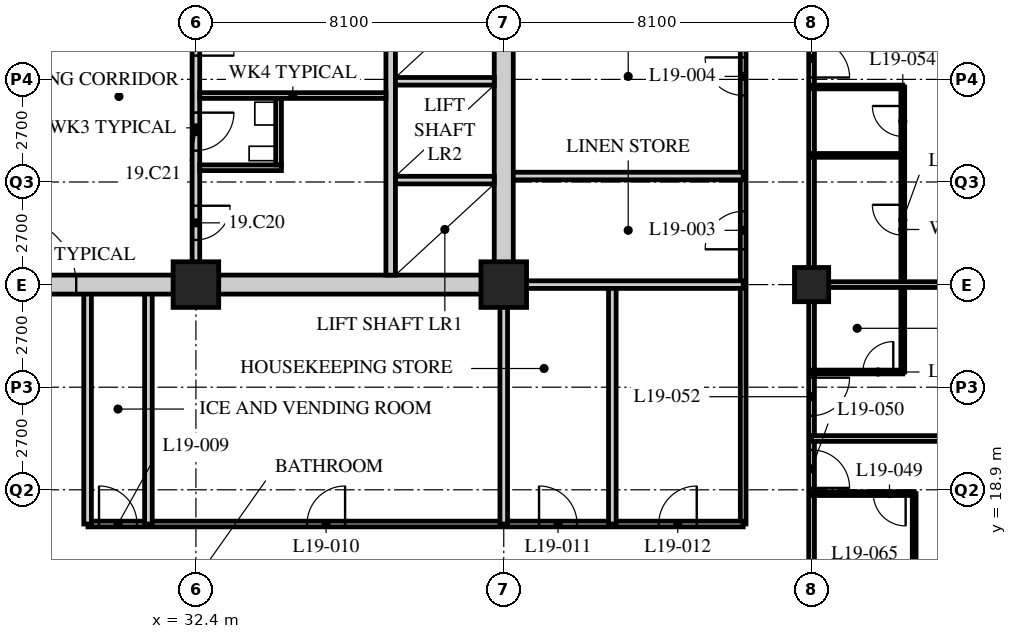
"""IFC4 building model, lengths in metres.
Left out: names, types, materials, properties, quantities, classifications, styles, units other than length and angle.
Written with IfcOpenShell. Run it as: python <this file> out.ifc"""

import sys

from ifc_helpers import new_model, si_unit, direction, frame, frame_2d, origin, origin_2d, place, context, subcontext, project, spatial, rectangle, hollow_rectangle, extrude, element, fill, save


model = new_model("IFC4")
c1 = context("Model", 3, precision=1e-05, world=origin(), true_north=direction((0.0, 1.0)))
c2 = subcontext(c1, "Body", "Model", "MODEL_VIEW")
j1 = project(units=[si_unit("LENGTHUNIT", "METRE"), si_unit("PLANEANGLEUNIT", "RADIAN")], contexts=[c1])
p1 = place(None, origin())
s1 = spatial("IfcSite", under=j1, at=p1, CompositionType="ELEMENT")
p2 = place(p1, origin())
s2 = spatial("IfcBuilding", under=s1, at=p2, CompositionType="ELEMENT")
p3 = place(p2, frame((0.0, 0.0, 77.2)))
s3 = spatial("IfcBuildingStorey", under=s2, at=p3, CompositionType="ELEMENT", Elevation=77.2)
for number, where, z_axis, x_axis in (
    (1, (32.4, 24.3, 0.0), (0.0, 0.0, 1.0), (1.0, 0.0, 0.0)),
    (2, (40.5, 24.3, 0.0), (0.0, 0.0, 1.0), (1.0, 0.0, 0.0)),
):
    element("IfcColumn", number, at=place(p3, frame(where, z_axis=z_axis, x_axis=x_axis)), inside=s3, PredefinedType="COLUMN", context=c2, shape_type="SweptSolid", body=[
        extrude(hollow_rectangle(XDim=1.2, YDim=1.2, WallThickness=0.12, at=origin_2d()), origin(), (0.0, 0.0, 1.0), 3.4),
    ])
p4 = place(p3, frame((48.6, 24.3, 0.0), z_axis=(0.0, 0.0, 1.0), x_axis=(1.0, 0.0, 0.0)))
e3 = element("IfcColumn", 3, at=p4, inside=s3, PredefinedType="COLUMN", context=c2, shape_type="SweptSolid", body=[
    extrude(hollow_rectangle(XDim=0.9, YDim=0.9, WallThickness=0.09, at=origin_2d()), origin(), (0.0, 0.0, 1.0), 3.4),
])
p5 = place(p3, frame((48.6, 16.2, 0.0), z_axis=(0.0, 0.0, 1.0), x_axis=(0.0, 1.0, 0.0)))
e4 = element("IfcWall", 4, at=p5, inside=s3, PredefinedType="PARTITIONING", context=c2, shape_type="SweptSolid", body=[
    extrude(rectangle(XDim=26.1, YDim=0.15, at=frame_2d((13.05, 0.0))), origin(), (0.0, 0.0, 1.0), 2.428),
])
p6 = place(p5, frame((2.75, 0.0, 0.0)))
e5 = element("IfcOpeningElement", 5, at=p6, cuts=e4, PredefinedType="OPENING", context=c2, shape_type="SweptSolid", body=[
    extrude(rectangle(XDim=1.0, YDim=2.1, at=frame_2d((0.5, 1.05))), frame((0.0, 0.085, 0.0), z_axis=(0.0, -1.0, 0.0), x_axis=(1.0, 0.0, 0.0)), (0.0, 0.0, 1.0), 0.17),
])
p7 = place(p5, frame((4.65, 0.0, 0.0)))
e6 = element("IfcOpeningElement", 6, at=p7, cuts=e4, PredefinedType="OPENING", context=c2, shape_type="SweptSolid", body=[
    extrude(rectangle(XDim=1.0, YDim=2.1, at=frame_2d((0.5, 1.05))), frame((0.0, 0.085, 0.0), z_axis=(0.0, -1.0, 0.0), x_axis=(1.0, 0.0, 0.0)), (0.0, 0.0, 1.0), 0.17),
])
p8 = place(p5, frame((13.55, 0.0, 0.0)))
e7 = element("IfcOpeningElement", 7, at=p8, cuts=e4, PredefinedType="OPENING", context=c2, shape_type="SweptSolid", body=[
    extrude(rectangle(XDim=1.0, YDim=2.1, at=frame_2d((0.5, 1.05))), frame((0.0, 0.085, 0.0), z_axis=(0.0, -1.0, 0.0), x_axis=(1.0, 0.0, 0.0)), (0.0, 0.0, 1.0), 0.17),
])
p9 = place(p5, frame((21.65, 0.0, 0.0)))
e8 = element("IfcOpeningElement", 8, at=p9, cuts=e4, PredefinedType="OPENING", context=c2, shape_type="SweptSolid", body=[
    extrude(rectangle(XDim=1.0, YDim=2.1, at=frame_2d((0.5, 1.05))), frame((0.0, 0.085, 0.0), z_axis=(0.0, -1.0, 0.0), x_axis=(1.0, 0.0, 0.0)), (0.0, 0.0, 1.0), 0.17),
])
p10 = place(p3, frame((46.8, 18.0, 0.0), z_axis=(0.0, 0.0, 1.0), x_axis=(0.0, 1.0, 0.0)))
e9 = element("IfcWall", 9, at=p10, inside=s3, PredefinedType="PARTITIONING", context=c2, shape_type="SweptSolid", body=[
    extrude(rectangle(XDim=22.5, YDim=0.15, at=frame_2d((11.25, 0.0))), origin(), (0.0, 0.0, 1.0), 3.19),
])
p11 = place(p10, frame((7.229, 0.0, 0.0)))
e10 = element("IfcOpeningElement", 10, at=p11, cuts=e9, PredefinedType="OPENING", context=c2, shape_type="SweptSolid", body=[
    extrude(rectangle(XDim=1.0, YDim=2.1, at=frame_2d((0.5, 1.05))), frame((0.0, 0.085, 0.0), z_axis=(0.0, -1.0, 0.0), x_axis=(1.0, 0.0, 0.0)), (0.0, 0.0, 1.0), 0.17),
])
p12 = place(p10, frame((11.279, 0.0, 0.0)))
e11 = element("IfcOpeningElement", 11, at=p12, cuts=e9, PredefinedType="OPENING", context=c2, shape_type="SweptSolid", body=[
    extrude(rectangle(XDim=1.0, YDim=2.1, at=frame_2d((0.5, 1.05))), frame((0.0, 0.085, 0.0), z_axis=(0.0, -1.0, 0.0), x_axis=(1.0, 0.0, 0.0)), (0.0, 0.0, 1.0), 0.17),
])
p13 = place(p10, frame((14.7, 0.0, 0.0)))
e12 = element("IfcOpeningElement", 12, at=p13, cuts=e9, PredefinedType="OPENING", context=c2, shape_type="SweptSolid", body=[
    extrude(rectangle(XDim=1.0, YDim=2.1, at=frame_2d((0.5, 1.05))), frame((0.0, 0.085, 0.0), z_axis=(0.0, -1.0, 0.0), x_axis=(1.0, 0.0, 0.0)), (0.0, 0.0, 1.0), 0.17),
])
p14 = place(p10, frame((18.75, 0.0, 0.0)))
e13 = element("IfcOpeningElement", 13, at=p14, cuts=e9, PredefinedType="OPENING", context=c2, shape_type="SweptSolid", body=[
    extrude(rectangle(XDim=1.0, YDim=2.1, at=frame_2d((0.5, 1.05))), frame((0.0, 0.085, 0.0), z_axis=(0.0, -1.0, 0.0), x_axis=(1.0, 0.0, 0.0)), (0.0, 0.0, 1.0), 0.17),
])
p15 = place(p3, frame((29.56, 18.0, 0.0), z_axis=(0.0, 0.0, 1.0), x_axis=(1.0, 0.0, 0.0)))
e14 = element("IfcWall", 14, at=p15, inside=s3, PredefinedType="PARTITIONING", context=c2, shape_type="SweptSolid", body=[
    extrude(rectangle(XDim=17.24, YDim=0.15, at=frame_2d((8.62, 0.0))), origin(), (0.0, 0.0, 1.0), 3.19),
])
p16 = place(p15, frame((0.29, 0.0, 0.0)))
e15 = element("IfcOpeningElement", 15, at=p16, cuts=e14, PredefinedType="OPENING", context=c2, shape_type="SweptSolid", body=[
    extrude(rectangle(XDim=1.0, YDim=2.1, at=frame_2d((0.5, 1.05))), frame((0.0, 0.085, 0.0), z_axis=(0.0, -1.0, 0.0), x_axis=(1.0, 0.0, 0.0)), (0.0, 0.0, 1.0), 0.17),
])
p17 = place(p15, frame((5.765, 0.0, 0.0)))
e16 = element("IfcOpeningElement", 16, at=p17, cuts=e14, PredefinedType="OPENING", context=c2, shape_type="SweptSolid", body=[
    extrude(rectangle(XDim=1.0, YDim=2.1, at=frame_2d((0.5, 1.05))), frame((0.0, 0.085, 0.0), z_axis=(0.0, -1.0, 0.0), x_axis=(1.0, 0.0, 0.0)), (0.0, 0.0, 1.0), 0.17),
])
p18 = place(p15, frame((11.869, 0.0, 0.0)))
e17 = element("IfcOpeningElement", 17, at=p18, cuts=e14, PredefinedType="OPENING", context=c2, shape_type="SweptSolid", body=[
    extrude(rectangle(XDim=1.0, YDim=2.1, at=frame_2d((0.5, 1.05))), frame((0.0, 0.085, 0.0), z_axis=(0.0, -1.0, 0.0), x_axis=(1.0, 0.0, 0.0)), (0.0, 0.0, 1.0), 0.17),
])
p19 = place(p15, frame((15.019, 0.0, 0.0)))
e18 = element("IfcOpeningElement", 18, at=p19, cuts=e14, PredefinedType="OPENING", context=c2, shape_type="SweptSolid", body=[
    extrude(rectangle(XDim=1.0, YDim=2.1, at=frame_2d((0.5, 1.05))), frame((0.0, 0.085, 0.0), z_axis=(0.0, -1.0, 0.0), x_axis=(1.0, 0.0, 0.0)), (0.0, 0.0, 1.0), 0.17),
])
p20 = place(p3, frame((46.8, 27.157, 0.0), z_axis=(0.0, 0.0, 1.0), x_axis=(-1.0, 0.0, 0.0)))
e19 = element("IfcWall", 19, at=p20, inside=s3, PredefinedType="SOLIDWALL", context=c2, shape_type="SweptSolid", body=[
    extrude(rectangle(XDim=6.3, YDim=0.2, at=frame_2d((3.15, 0.0))), origin(), (0.0, 0.0, 1.0), 3.19),
])
p21 = place(p3, frame((40.5, 18.0, 0.0), z_axis=(0.0, 0.0, 1.0), x_axis=(0.0, 1.0, 0.0)))
e20 = element("IfcWall", 20, at=p21, inside=s3, PredefinedType="SOLIDWALL", context=c2, shape_type="SweptSolid", body=[
    extrude(rectangle(XDim=6.3, YDim=0.2, at=frame_2d((3.15, 0.0))), origin(), (0.0, 0.0, 1.0), 2.428),
])
for number, where, z_axis, x_axis in (
    (21, (31.15, 18.0, 0.0), (0.0, 0.0, 1.0), (0.0, 1.0, 0.0)),
    (22, (43.357, 18.0, 0.0), (0.0, 0.0, 1.0), (0.0, 1.0, 0.0)),
    (23, (29.55, 18.0, 0.0), (0.0, 0.0, 1.0), (0.0, 1.0, 0.0)),
):
    element("IfcWall", number, at=place(p3, frame(where, z_axis=z_axis, x_axis=x_axis)), inside=s3, PredefinedType="SOLIDWALL", context=c2, shape_type="SweptSolid", body=[
        extrude(rectangle(XDim=6.3, YDim=0.2, at=frame_2d((3.15, 0.0))), origin(), (0.0, 0.0, 1.0), 3.19),
    ])
p22 = place(p3, frame((40.5, 24.3, 0.0), z_axis=(0.0, 0.0, 1.0), x_axis=(1.0, 0.0, 0.0)))
e24 = element("IfcWall", 24, at=p22, inside=s3, PredefinedType="SOLIDWALL", context=c2, shape_type="SweptSolid", body=[
    extrude(rectangle(XDim=6.3, YDim=0.2, at=frame_2d((3.15, 0.0))), origin(), (0.0, 0.0, 1.0), 2.428),
])
p23 = place(p3, frame((51.3, 16.2, 0.0), z_axis=(0.0, 0.0, 1.0), x_axis=(0.0, 1.0, 0.0)))
e25 = element("IfcWall", 25, at=p23, inside=s3, PredefinedType="PARTITIONING", context=c2, shape_type="SweptSolid", body=[
    extrude(rectangle(XDim=2.6, YDim=0.1, at=frame_2d((1.3, 0.0))), origin(), (0.0, 0.0, 1.0), 3.19),
])
p24 = place(p3, frame((48.6, 18.8, 0.0), z_axis=(0.0, 0.0, 1.0), x_axis=(1.0, 0.0, 0.0)))
e26 = element("IfcWall", 26, at=p24, inside=s3, PredefinedType="PARTITIONING", context=c2, shape_type="SweptSolid", body=[
    extrude(rectangle(XDim=2.7, YDim=0.1, at=frame_2d((1.35, 0.0))), origin(), (0.0, 0.0, 1.0), 3.19),
])
p25 = place(p24, frame((1.625, 0.0, 0.0)))
e27 = element("IfcOpeningElement", 27, at=p25, cuts=e26, PredefinedType="OPENING", context=c2, shape_type="SweptSolid", body=[
    extrude(rectangle(XDim=0.85, YDim=2.1, at=frame_2d((0.425, 1.05))), frame((0.0, 0.06, 0.0), z_axis=(0.0, -1.0, 0.0), x_axis=(1.0, 0.0, 0.0)), (0.0, 0.0, 1.0), 0.12),
])
p26 = place(p3, frame((48.6, 20.25, 0.0), z_axis=(0.0, 0.0, 1.0), x_axis=(1.0, 0.0, 0.0)))
e28 = element("IfcWall", 28, at=p26, inside=s3, PredefinedType="PARTITIONING", context=c2, shape_type="SweptSolid", body=[
    extrude(rectangle(XDim=7.8, YDim=0.15, at=frame_2d((3.9, 0.0))), origin(), (0.0, 0.0, 1.0), 3.19),
])
p27 = place(p3, frame((51.0, 22.0, 0.0), z_axis=(0.0, 0.0, 1.0), x_axis=(0.0, 1.0, 0.0)))
e29 = element("IfcWall", 29, at=p27, inside=s3, PredefinedType="PARTITIONING", context=c2, shape_type="SweptSolid", body=[
    extrude(rectangle(XDim=7.5, YDim=0.1, at=frame_2d((3.75, 0.0))), origin(), (0.0, 0.0, 1.0), 3.19),
])
p28 = place(p27, frame((3.6, 0.0, 0.0)))
e30 = element("IfcOpeningElement", 30, at=p28, cuts=e29, PredefinedType="OPENING", context=c2, shape_type="SweptSolid", body=[
    extrude(rectangle(XDim=0.8, YDim=2.1, at=frame_2d((0.4, 1.05))), frame((0.0, 0.06, 0.0), z_axis=(0.0, -1.0, 0.0), x_axis=(1.0, 0.0, 0.0)), (0.0, 0.0, 1.0), 0.12),
])
p29 = place(p27, frame((6.2, 0.0, 0.0)))
e31 = element("IfcOpeningElement", 31, at=p29, cuts=e29, PredefinedType="OPENING", context=c2, shape_type="SweptSolid", body=[
    extrude(rectangle(XDim=0.8, YDim=2.1, at=frame_2d((0.4, 1.05))), frame((0.0, 0.06, 0.0), z_axis=(0.0, -1.0, 0.0), x_axis=(1.0, 0.0, 0.0)), (0.0, 0.0, 1.0), 0.12),
])
p30 = place(p3, frame((48.6, 22.0, 0.0), z_axis=(0.0, 0.0, 1.0), x_axis=(1.0, 0.0, 0.0)))
e32 = element("IfcWall", 32, at=p30, inside=s3, PredefinedType="PARTITIONING", context=c2, shape_type="SweptSolid", body=[
    extrude(rectangle(XDim=2.4, YDim=0.1, at=frame_2d((1.2, 0.0))), origin(), (0.0, 0.0, 1.0), 3.19),
])
p31 = place(p30, frame((1.35, 0.0, 0.0)))
e33 = element("IfcOpeningElement", 33, at=p31, cuts=e32, PredefinedType="OPENING", context=c2, shape_type="SweptSolid", body=[
    extrude(rectangle(XDim=0.8, YDim=2.1, at=frame_2d((0.4, 1.05))), frame((0.0, 0.06, 0.0), z_axis=(0.0, -1.0, 0.0), x_axis=(1.0, 0.0, 0.0)), (0.0, 0.0, 1.0), 0.12),
])
p32 = place(p3, frame((48.6, 24.3, 0.0), z_axis=(0.0, 0.0, 1.0), x_axis=(1.0, 0.0, 0.0)))
e34 = element("IfcWall", 34, at=p32, inside=s3, PredefinedType="PARTITIONING", context=c2, shape_type="SweptSolid", body=[
    extrude(rectangle(XDim=7.8, YDim=0.15, at=frame_2d((3.9, 0.0))), origin(), (0.0, 0.0, 1.0), 2.428),
])
for number, where, z_axis, x_axis in (
    (35, (48.6, 27.7, 0.0), (0.0, 0.0, 1.0), (1.0, 0.0, 0.0)),
    (36, (48.6, 29.5, 0.0), (0.0, 0.0, 1.0), (1.0, 0.0, 0.0)),
):
    element("IfcWall", number, at=place(p3, frame(where, z_axis=z_axis, x_axis=x_axis)), inside=s3, PredefinedType="PARTITIONING", context=c2, shape_type="SweptSolid", body=[
        extrude(rectangle(XDim=2.4, YDim=0.1, at=frame_2d((1.2, 0.0))), origin(), (0.0, 0.0, 1.0), 3.19),
    ])
p33 = place(p3, frame((15.95, 24.3, 0.0), z_axis=(0.0, 0.0, 1.0), x_axis=(1.0, 0.0, 0.0)))
e37 = element("IfcWall", 37, at=p33, inside=s3, PredefinedType="SOLIDWALL", context=c2, shape_type="SweptSolid", body=[
    extrude(rectangle(XDim=24.8, YDim=0.5, at=frame_2d((12.4, 0.0))), origin(), (0.0, 0.0, 1.0), 2.428),
])
p34 = place(p33, frame((11.5, 0.0, 0.0)))
e38 = element("IfcOpeningElement", 38, at=p34, cuts=e37, PredefinedType="OPENING", context=c2, shape_type="SweptSolid", body=[
    extrude(rectangle(XDim=1.8, YDim=2.4, at=frame_2d((0.9, 1.2))), frame((0.0, 0.26, 0.0), z_axis=(0.0, -1.0, 0.0), x_axis=(1.0, 0.0, 0.0)), (0.0, 0.0, 1.0), 0.52),
])
p35 = place(p3, frame((40.5, 24.55, 0.0), z_axis=(0.0, 0.0, 1.0), x_axis=(0.0, 1.0, 0.0)))
e39 = element("IfcWall", 39, at=p35, inside=s3, PredefinedType="SOLIDWALL", context=c2, shape_type="SweptSolid", body=[
    extrude(rectangle(XDim=15.7, YDim=0.5, at=frame_2d((7.85, 0.0))), origin(), (0.0, 0.0, 1.0), 2.428),
])
p36 = place(p3, frame((37.525, 24.55, 0.0), z_axis=(0.0, 0.0, 1.0), x_axis=(0.0, 1.0, 0.0)))
e40 = element("IfcWall", 40, at=p36, inside=s3, PredefinedType="SOLIDWALL", context=c2, shape_type="SweptSolid", body=[
    extrude(rectangle(XDim=7.75, YDim=0.25, at=frame_2d((3.875, 0.0))), origin(), (0.0, 0.0, 1.0), 3.19),
])
for number, where, z_axis, x_axis in (
    (41, (37.65, 27.05, 0.0), (0.0, 0.0, 1.0), (1.0, 0.0, 0.0)),
    (42, (37.65, 29.65, 0.0), (0.0, 0.0, 1.0), (1.0, 0.0, 0.0)),
):
    element("IfcWall", number, at=place(p3, frame(where, z_axis=z_axis, x_axis=x_axis)), inside=s3, PredefinedType="SOLIDWALL", context=c2, shape_type="SweptSolid", body=[
        extrude(rectangle(XDim=2.6, YDim=0.2, at=frame_2d((1.3, 0.0))), origin(), (0.0, 0.0, 1.0), 3.19),
    ])
p37 = place(p3, frame((32.4, 24.55, 0.0), z_axis=(0.0, 0.0, 1.0), x_axis=(0.0, 1.0, 0.0)))
e43 = element("IfcWall", 43, at=p37, inside=s3, PredefinedType="PARTITIONING", context=c2, shape_type="SweptSolid", body=[
    extrude(rectangle(XDim=7.75, YDim=0.2, at=frame_2d((3.875, 0.0))), origin(), (0.0, 0.0, 1.0), 2.578),
])
p38 = place(p37, frame((0.925, 0.0, 0.0)))
e44 = element("IfcOpeningElement", 44, at=p38, cuts=e43, PredefinedType="OPENING", context=c2, shape_type="SweptSolid", body=[
    extrude(rectangle(XDim=0.9, YDim=2.1, at=frame_2d((0.45, 1.05))), frame((0.0, 0.11, 0.0), z_axis=(0.0, -1.0, 0.0), x_axis=(1.0, 0.0, 0.0)), (0.0, 0.0, 1.0), 0.22),
])
p39 = place(p37, frame((3.275, 0.0, 0.0)))
e45 = element("IfcOpeningElement", 45, at=p39, cuts=e43, PredefinedType="OPENING", context=c2, shape_type="SweptSolid", body=[
    extrude(rectangle(XDim=1.0, YDim=2.1, at=frame_2d((0.5, 1.05))), frame((0.0, 0.11, 0.0), z_axis=(0.0, -1.0, 0.0), x_axis=(1.0, 0.0, 0.0)), (0.0, 0.0, 1.0), 0.22),
])
p40 = place(p37, frame((5.775, 0.0, 0.0)))
e46 = element("IfcOpeningElement", 46, at=p40, cuts=e43, PredefinedType="OPENING", context=c2, shape_type="SweptSolid", body=[
    extrude(rectangle(XDim=1.0, YDim=2.1, at=frame_2d((0.5, 1.05))), frame((0.0, 0.11, 0.0), z_axis=(0.0, -1.0, 0.0), x_axis=(1.0, 0.0, 0.0)), (0.0, 0.0, 1.0), 0.22),
])
p41 = place(p3, frame((32.5, 27.375, 0.0), z_axis=(0.0, 0.0, 1.0), x_axis=(1.0, 0.0, 0.0)))
e47 = element("IfcWall", 47, at=p41, inside=s3, PredefinedType="PARTITIONING", context=c2, shape_type="SweptSolid", body=[
    extrude(rectangle(XDim=2.15, YDim=0.15, at=frame_2d((1.075, 0.0))), origin(), (0.0, 0.0, 1.0), 3.19),
])
p42 = place(p3, frame((32.5, 29.275, 0.0), z_axis=(0.0, 0.0, 1.0), x_axis=(1.0, 0.0, 0.0)))
e48 = element("IfcWall", 48, at=p42, inside=s3, PredefinedType="PARTITIONING", context=c2, shape_type="SweptSolid", body=[
    extrude(rectangle(XDim=4.9, YDim=0.15, at=frame_2d((2.45, 0.0))), origin(), (0.0, 0.0, 1.0), 3.19),
])
p43 = place(p3, frame((34.575, 27.45, 0.0), z_axis=(0.0, 0.0, 1.0), x_axis=(0.0, 1.0, 0.0)))
e49 = element("IfcWall", 49, at=p43, inside=s3, PredefinedType="PARTITIONING", context=c2, shape_type="SweptSolid", body=[
    extrude(rectangle(XDim=1.75, YDim=0.15, at=frame_2d((0.875, 0.0))), origin(), (0.0, 0.0, 1.0), 3.19),
])
p44 = place(p11, origin())
e50 = element("IfcDoor", 50, at=p44, inside=s3, OperationType="SINGLE_SWING_LEFT", PredefinedType="DOOR", context=c2, shape_type="SweptSolid", body=[
    extrude(rectangle(XDim=1.0, YDim=2.1, at=frame_2d((0.5, 1.05))), frame((0.0, 0.025, 0.0), z_axis=(0.0, -1.0, 0.0), x_axis=(1.0, 0.0, 0.0)), (0.0, 0.0, 1.0), 0.05),
])
fill(e10, e50)
p45 = place(p12, origin())
e51 = element("IfcDoor", 51, at=p45, inside=s3, OperationType="SINGLE_SWING_RIGHT", PredefinedType="DOOR", context=c2, shape_type="SweptSolid", body=[
    extrude(rectangle(XDim=1.0, YDim=2.1, at=frame_2d((0.5, 1.05))), frame((0.0, 0.025, 0.0), z_axis=(0.0, -1.0, 0.0), x_axis=(1.0, 0.0, 0.0)), (0.0, 0.0, 1.0), 0.05),
])
fill(e11, e51)
p46 = place(p16, origin())
e52 = element("IfcDoor", 52, at=p46, inside=s3, OperationType="SINGLE_SWING_LEFT", PredefinedType="DOOR", context=c2, shape_type="SweptSolid", body=[
    extrude(rectangle(XDim=1.0, YDim=2.1, at=frame_2d((0.5, 1.05))), frame((0.0, 0.025, 0.0), z_axis=(0.0, -1.0, 0.0), x_axis=(1.0, 0.0, 0.0)), (0.0, 0.0, 1.0), 0.05),
])
fill(e15, e52)
p47 = place(p17, origin())
e53 = element("IfcDoor", 53, at=p47, inside=s3, OperationType="SINGLE_SWING_RIGHT", PredefinedType="DOOR", context=c2, shape_type="SweptSolid", body=[
    extrude(rectangle(XDim=1.0, YDim=2.1, at=frame_2d((0.5, 1.05))), frame((0.0, 0.025, 0.0), z_axis=(0.0, -1.0, 0.0), x_axis=(1.0, 0.0, 0.0)), (0.0, 0.0, 1.0), 0.05),
])
fill(e16, e53)
p48 = place(p18, origin())
e54 = element("IfcDoor", 54, at=p48, inside=s3, OperationType="SINGLE_SWING_LEFT", PredefinedType="DOOR", context=c2, shape_type="SweptSolid", body=[
    extrude(rectangle(XDim=1.0, YDim=2.1, at=frame_2d((0.5, 1.05))), frame((0.0, 0.025, 0.0), z_axis=(0.0, -1.0, 0.0), x_axis=(1.0, 0.0, 0.0)), (0.0, 0.0, 1.0), 0.05),
])
fill(e17, e54)
p49 = place(p19, origin())
e55 = element("IfcDoor", 55, at=p49, inside=s3, OperationType="SINGLE_SWING_RIGHT", PredefinedType="DOOR", context=c2, shape_type="SweptSolid", body=[
    extrude(rectangle(XDim=1.0, YDim=2.1, at=frame_2d((0.5, 1.05))), frame((0.0, 0.025, 0.0), z_axis=(0.0, -1.0, 0.0), x_axis=(1.0, 0.0, 0.0)), (0.0, 0.0, 1.0), 0.05),
])
fill(e18, e55)
p50 = place(p25, origin())
e56 = element("IfcDoor", 56, at=p50, inside=s3, OperationType="SINGLE_SWING_LEFT", PredefinedType="DOOR", context=c2, shape_type="SweptSolid", body=[
    extrude(rectangle(XDim=0.85, YDim=2.1, at=frame_2d((0.425, 1.05))), frame((0.0, 0.025, 0.0), z_axis=(0.0, -1.0, 0.0), x_axis=(1.0, 0.0, 0.0)), (0.0, 0.0, 1.0), 0.05),
])
fill(e27, e56)
p51 = place(p6, origin())
e57 = element("IfcDoor", 57, at=p51, inside=s3, OperationType="SINGLE_SWING_RIGHT", PredefinedType="DOOR", context=c2, shape_type="SweptSolid", body=[
    extrude(rectangle(XDim=1.0, YDim=2.1, at=frame_2d((0.5, 1.05))), frame((0.0, 0.025, 0.0), z_axis=(0.0, -1.0, 0.0), x_axis=(1.0, 0.0, 0.0)), (0.0, 0.0, 1.0), 0.05),
])
fill(e5, e57)
p52 = place(p31, origin())
e58 = element("IfcDoor", 58, at=p52, inside=s3, OperationType="SINGLE_SWING_RIGHT", PredefinedType="DOOR", context=c2, shape_type="SweptSolid", body=[
    extrude(rectangle(XDim=0.8, YDim=2.1, at=frame_2d((0.4, 1.05))), frame((0.0, 0.025, 0.0), z_axis=(0.0, -1.0, 0.0), x_axis=(1.0, 0.0, 0.0)), (0.0, 0.0, 1.0), 0.05),
])
fill(e33, e58)
p53 = place(p7, origin())
e59 = element("IfcDoor", 59, at=p53, inside=s3, OperationType="SINGLE_SWING_LEFT", PredefinedType="DOOR", context=c2, shape_type="SweptSolid", body=[
    extrude(rectangle(XDim=1.0, YDim=2.1, at=frame_2d((0.5, 1.05))), frame((0.0, 0.025, 0.0), z_axis=(0.0, -1.0, 0.0), x_axis=(1.0, 0.0, 0.0)), (0.0, 0.0, 1.0), 0.05),
])
fill(e6, e59)
p54 = place(p28, origin())
e60 = element("IfcDoor", 60, at=p54, inside=s3, OperationType="SINGLE_SWING_RIGHT", PredefinedType="DOOR", context=c2, shape_type="SweptSolid", body=[
    extrude(rectangle(XDim=0.8, YDim=2.1, at=frame_2d((0.4, 1.05))), frame((0.0, 0.025, 0.0), z_axis=(0.0, -1.0, 0.0), x_axis=(1.0, 0.0, 0.0)), (0.0, 0.0, 1.0), 0.05),
])
fill(e30, e60)
p55 = place(p29, origin())
e61 = element("IfcDoor", 61, at=p55, inside=s3, OperationType="SINGLE_SWING_RIGHT", PredefinedType="DOOR", context=c2, shape_type="SweptSolid", body=[
    extrude(rectangle(XDim=0.8, YDim=2.1, at=frame_2d((0.4, 1.05))), frame((0.0, 0.025, 0.0), z_axis=(0.0, -1.0, 0.0), x_axis=(1.0, 0.0, 0.0)), (0.0, 0.0, 1.0), 0.05),
])
fill(e31, e61)
p56 = place(p8, origin())
e62 = element("IfcDoor", 62, at=p56, inside=s3, OperationType="SINGLE_SWING_RIGHT", PredefinedType="DOOR", context=c2, shape_type="SweptSolid", body=[
    extrude(rectangle(XDim=1.0, YDim=2.1, at=frame_2d((0.5, 1.05))), frame((0.0, 0.025, 0.0), z_axis=(0.0, -1.0, 0.0), x_axis=(1.0, 0.0, 0.0)), (0.0, 0.0, 1.0), 0.05),
])
fill(e7, e62)
p57 = place(p38, origin())
e63 = element("IfcDoor", 63, at=p57, inside=s3, OperationType="SINGLE_SWING_LEFT", PredefinedType="DOOR", context=c2, shape_type="SweptSolid", body=[
    extrude(rectangle(XDim=0.9, YDim=2.1, at=frame_2d((0.45, 1.05))), frame((0.0, 0.025, 0.0), z_axis=(0.0, -1.0, 0.0), x_axis=(1.0, 0.0, 0.0)), (0.0, 0.0, 1.0), 0.05),
])
fill(e44, e63)
p58 = place(p39, origin())
e64 = element("IfcDoor", 64, at=p58, inside=s3, OperationType="SINGLE_SWING_LEFT", PredefinedType="DOOR", context=c2, shape_type="SweptSolid", body=[
    extrude(rectangle(XDim=1.0, YDim=2.1, at=frame_2d((0.5, 1.05))), frame((0.0, 0.025, 0.0), z_axis=(0.0, -1.0, 0.0), x_axis=(1.0, 0.0, 0.0)), (0.0, 0.0, 1.0), 0.05),
])
fill(e45, e64)
p59 = place(p40, origin())
e65 = element("IfcDoor", 65, at=p59, inside=s3, OperationType="SINGLE_SWING_RIGHT", PredefinedType="DOOR", context=c2, shape_type="SweptSolid", body=[
    extrude(rectangle(XDim=1.0, YDim=2.1, at=frame_2d((0.5, 1.05))), frame((0.0, 0.025, 0.0), z_axis=(0.0, -1.0, 0.0), x_axis=(1.0, 0.0, 0.0)), (0.0, 0.0, 1.0), 0.05),
])
fill(e46, e65)
p60 = place(p34, origin())
e66 = element("IfcDoor", 66, at=p60, inside=s3, OperationType="DOUBLE_DOOR_SINGLE_SWING", PredefinedType="DOOR", context=c2, shape_type="SweptSolid", body=[
    extrude(rectangle(XDim=1.8, YDim=2.4, at=frame_2d((0.9, 1.2))), frame((0.0, 0.025, 0.0), z_axis=(0.0, -1.0, 0.0), x_axis=(1.0, 0.0, 0.0)), (0.0, 0.0, 1.0), 0.05),
])
fill(e38, e66)
save(model, sys.argv[1])
